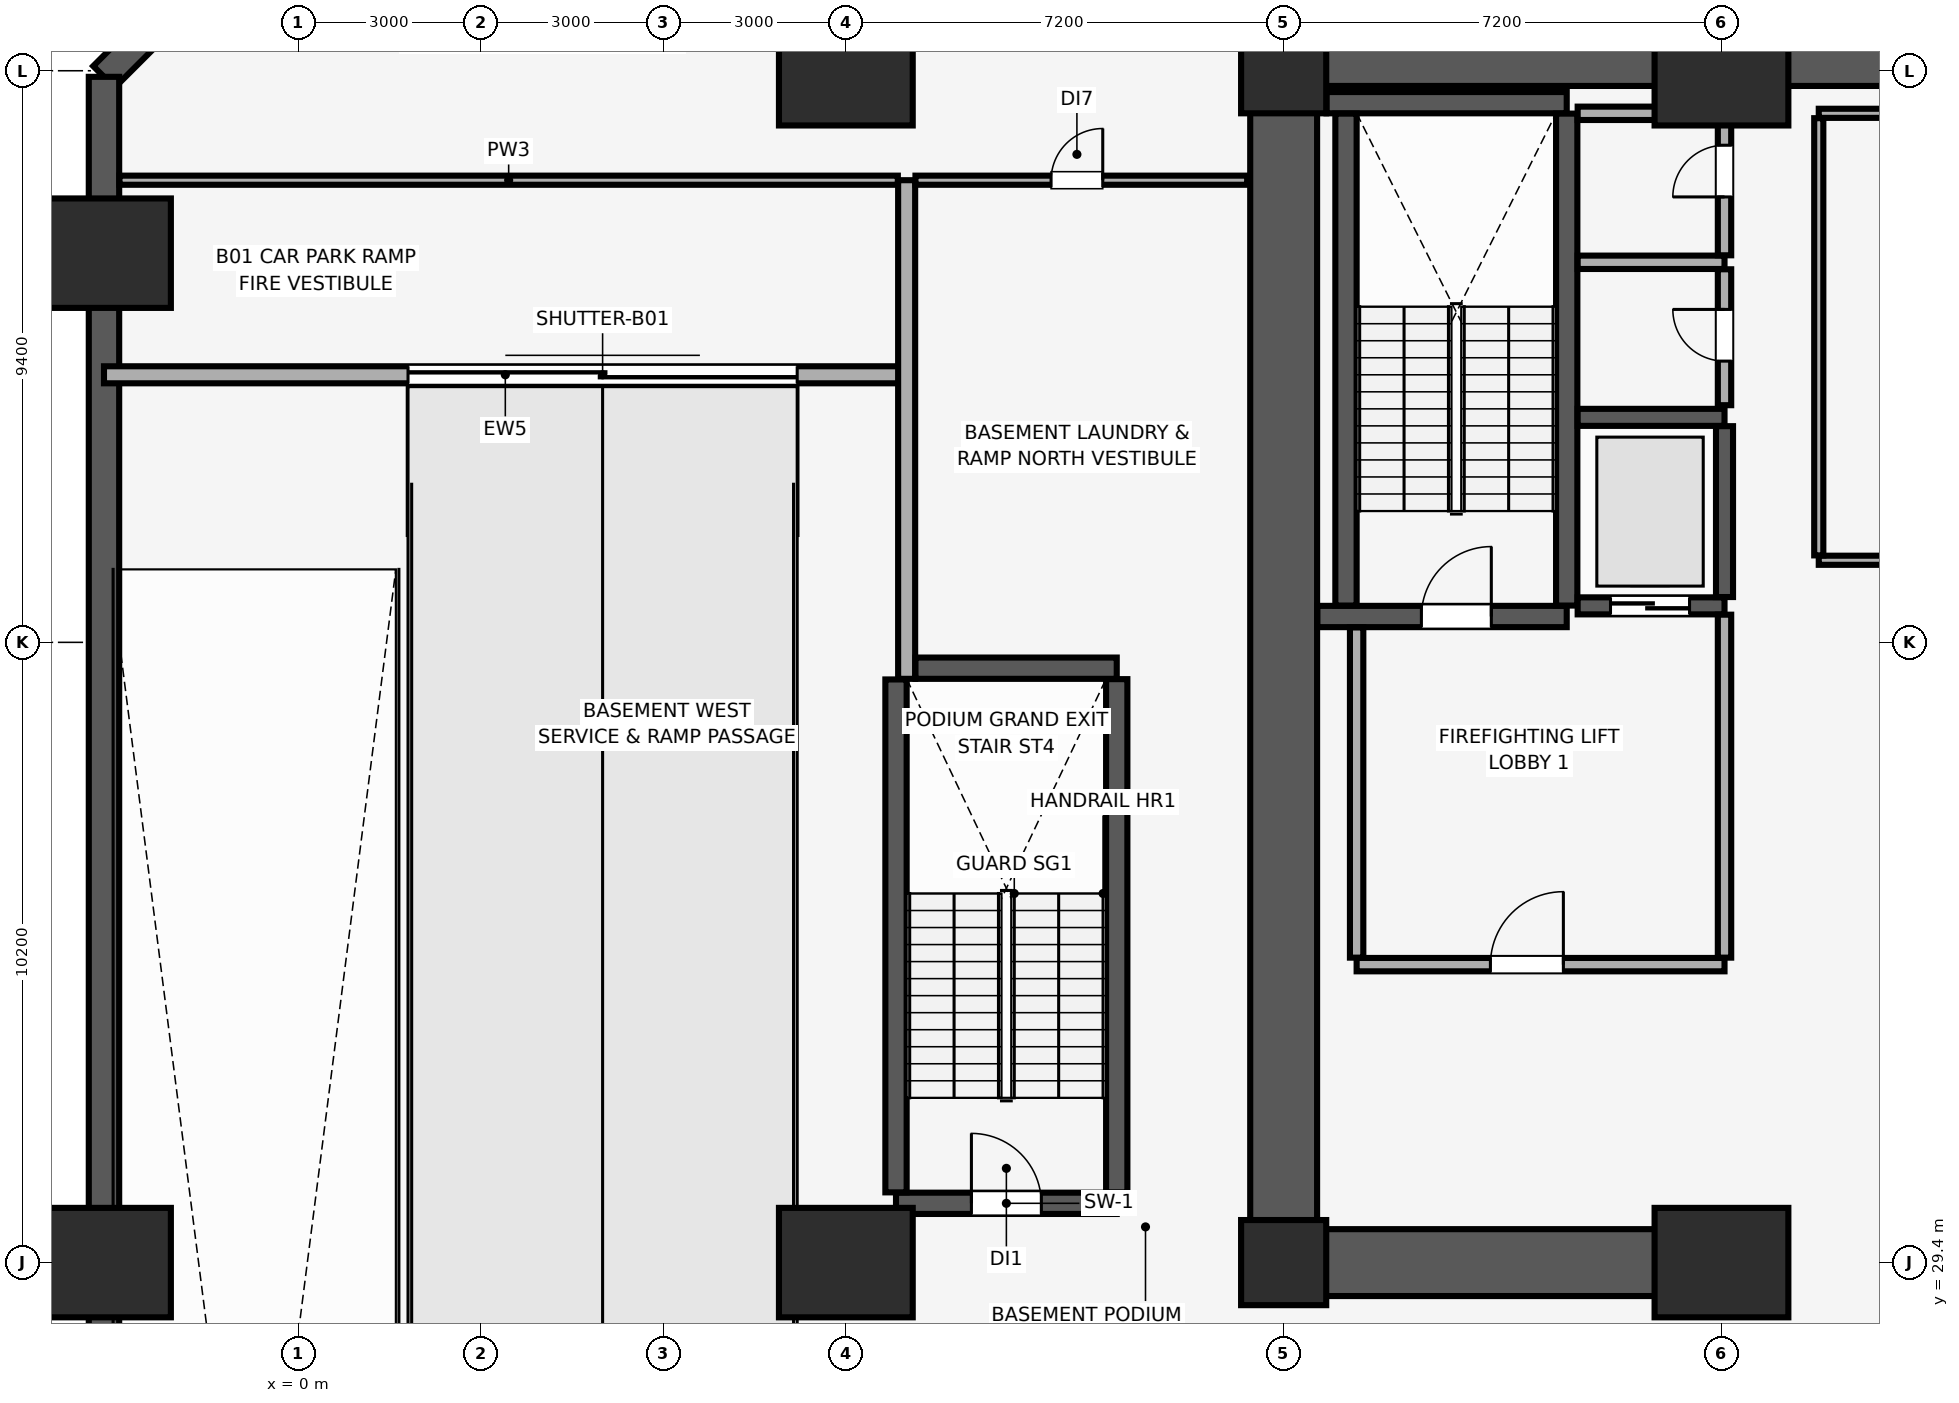
"""IFC4 building model, lengths in metres.
Left out: names, types, materials, properties, quantities, classifications, styles, units other than length and angle.
Written with IfcOpenShell. Run it as: python <this file> out.ifc"""

import sys

from ifc_helpers import new_model, si_unit, direction, frame, frame_2d, origin, origin_2d, place, context, subcontext, project, spatial, rectangle, extrude, element, fill, save


model = new_model("IFC4")
c1 = context("Model", 3, precision=1e-05, world=origin(), true_north=direction((0.0, 1.0)))
c2 = subcontext(c1, "Body", "Model", "MODEL_VIEW")
j1 = project(units=[si_unit("LENGTHUNIT", "METRE"), si_unit("PLANEANGLEUNIT", "RADIAN")], contexts=[c1])
p1 = place(None, origin())
s1 = spatial("IfcSite", under=j1, at=p1, CompositionType="ELEMENT")
p2 = place(p1, origin())
s2 = spatial("IfcBuilding", under=s1, at=p2, CompositionType="ELEMENT")
p3 = place(p2, frame((0.0, 0.0, -4.6)))
s3 = spatial("IfcBuildingStorey", under=s2, at=p3, CompositionType="ELEMENT", Elevation=-4.6)
for number, where, z_axis, x_axis in (
    (1, (-3.2, 29.4, 0.0), (0.0, 0.0, 1.0), (1.0, 0.0, 0.0)),
    (2, (-3.2, 46.0, 0.0), (0.0, 0.0, 1.0), (1.0, 0.0, 0.0)),
    (3, (9.0, 29.4, 0.0), (0.0, 0.0, 1.0), (1.0, 0.0, 0.0)),
    (4, (9.0, 49.0, 0.0), (0.0, 0.0, 1.0), (1.0, 0.0, 0.0)),
    (5, (23.4, 29.4, 0.0), (0.0, 0.0, 1.0), (1.0, 0.0, 0.0)),
    (6, (23.4, 49.0, 0.0), (0.0, 0.0, 1.0), (1.0, 0.0, 0.0)),
):
    element("IfcColumn", number, at=place(p3, frame(where, z_axis=z_axis, x_axis=x_axis)), inside=s3, PredefinedType="USERDEFINED", context=c2, shape_type="SweptSolid", body=[
        extrude(rectangle(XDim=2.2, YDim=1.8, at=origin_2d()), origin(), (0.0, 0.0, 1.0), 4.25),
    ])
for number, where, z_axis, x_axis in (
    (7, (16.2, 29.4, 0.0), (0.0, 0.0, 1.0), (1.0, 0.0, 0.0)),
    (8, (16.2, 49.0, 0.0), (0.0, 0.0, 1.0), (1.0, 0.0, 0.0)),
):
    element("IfcColumn", number, at=place(p3, frame(where, z_axis=z_axis, x_axis=x_axis)), inside=s3, PredefinedType="COLUMN", context=c2, shape_type="SweptSolid", body=[
        extrude(rectangle(XDim=1.4, YDim=1.4, at=origin_2d()), origin(), (0.0, 0.0, 1.0), 4.25),
    ])
p4 = place(p3, frame((0.4, 52.5, 0.0), z_axis=(0.0, 0.0, 1.0), x_axis=(-0.707082803744, -0.707130757816, 0.0)))
e9 = element("IfcWall", 9, at=p4, inside=s3, PredefinedType="USERDEFINED", context=c2, shape_type="SweptSolid", body=[
    extrude(rectangle(XDim=5.091, YDim=0.5, at=frame_2d((2.545, 0.0))), origin(), (0.0, 0.0, 1.0), 4.25),
])
p5 = place(p3, frame((-3.2, 48.9, 0.0), z_axis=(0.0, 0.0, 1.0), x_axis=(0.0, -1.0, 0.0)))
e10 = element("IfcWall", 10, at=p5, inside=s3, PredefinedType="USERDEFINED", context=c2, shape_type="SweptSolid", body=[
    extrude(rectangle(XDim=47.8, YDim=0.5, at=frame_2d((23.9, 0.0))), origin(), (0.0, 0.0, 1.0), 4.25),
])
p6 = place(p3, frame((-3.2, 44.0, 0.0), z_axis=(0.0, 0.0, 1.0), x_axis=(1.0, 0.0, 0.0)))
e11 = element("IfcWall", 11, at=p6, inside=s3, PredefinedType="SOLIDWALL", context=c2, shape_type="SweptSolid", body=[
    extrude(rectangle(XDim=13.2, YDim=0.28, at=frame_2d((6.6, 0.0))), origin(), (0.0, 0.0, 1.0), 4.25),
])
p7 = place(p6, frame((5.0, 0.0, 0.0)))
e12 = element("IfcOpeningElement", 12, at=p7, cuts=e11, PredefinedType="OPENING", context=c2, shape_type="SweptSolid", body=[
    extrude(rectangle(XDim=6.4, YDim=3.1, at=frame_2d((3.2, 1.55))), frame((0.0, 0.15, 0.0), z_axis=(0.0, -1.0, 0.0), x_axis=(1.0, 0.0, 0.0)), (0.0, 0.0, 1.0), 0.3),
])
p8 = place(p3, frame((10.0, 39.0, 0.0), z_axis=(0.0, 0.0, 1.0), x_axis=(0.0, 1.0, 0.0)))
e13 = element("IfcWall", 13, at=p8, inside=s3, PredefinedType="SOLIDWALL", context=c2, shape_type="SweptSolid", body=[
    extrude(rectangle(XDim=8.2, YDim=0.28, at=frame_2d((4.1, 0.0))), origin(), (0.0, 0.0, 1.0), 4.25),
])
p9 = place(p3, frame((16.2, 49.3, 0.0), z_axis=(0.0, 0.0, 1.0), x_axis=(1.0, 0.0, 0.0)))
e14 = element("IfcWall", 14, at=p9, inside=s3, PredefinedType="SHEAR", context=c2, shape_type="SweptSolid", body=[
    extrude(rectangle(XDim=51.6, YDim=1.1, at=frame_2d((25.8, 0.0))), origin(), (0.0, 0.0, 1.0), 4.25),
])
p10 = place(p3, frame((16.2, 29.4, 0.0), z_axis=(0.0, 0.0, 1.0), x_axis=(0.0, 1.0, 0.0)))
e15 = element("IfcWall", 15, at=p10, inside=s3, PredefinedType="SHEAR", context=c2, shape_type="SweptSolid", body=[
    extrude(rectangle(XDim=19.2, YDim=1.1, at=frame_2d((9.6, 0.0))), origin(), (0.0, 0.0, 1.0), 4.25),
])
p11 = place(p3, frame((16.755, 29.4, 0.0), z_axis=(0.0, 0.0, 1.0), x_axis=(1.0, 0.0, 0.0)))
e16 = element("IfcWall", 16, at=p11, inside=s3, PredefinedType="SHEAR", context=c2, shape_type="SweptSolid", body=[
    extrude(rectangle(XDim=6.845, YDim=1.1, at=frame_2d((3.423, 0.0))), origin(), (0.0, 0.0, 1.0), 4.25),
])
p12 = place(p3, frame((16.755, 40.025, 0.0), z_axis=(0.0, 0.0, 1.0), x_axis=(1.0, 0.0, 0.0)))
e17 = element("IfcWall", 17, at=p12, inside=s3, PredefinedType="SHEAR", context=c2, shape_type="SweptSolid", body=[
    extrude(rectangle(XDim=4.1, YDim=0.35, at=frame_2d((2.05, 0.0))), origin(), (0.0, 0.0, 1.0), 4.25),
])
p13 = place(p12, frame((1.71, 0.0, 0.0)))
e18 = element("IfcOpeningElement", 18, at=p13, cuts=e17, PredefinedType="OPENING", context=c2, shape_type="SweptSolid", body=[
    extrude(rectangle(XDim=1.15, YDim=2.15, at=frame_2d((0.575, 1.075))), frame((0.0, 0.185, 0.0), z_axis=(0.0, -1.0, 0.0), x_axis=(1.0, 0.0, 0.0)), (0.0, 0.0, 1.0), 0.37),
])
p14 = place(p3, frame((16.905, 48.475, 0.0), z_axis=(0.0, 0.0, 1.0), x_axis=(1.0, 0.0, 0.0)))
e19 = element("IfcWall", 19, at=p14, inside=s3, PredefinedType="SHEAR", context=c2, shape_type="SweptSolid", body=[
    extrude(rectangle(XDim=3.95, YDim=0.35, at=frame_2d((1.975, 0.0))), origin(), (0.0, 0.0, 1.0), 4.25),
])
for number, where, z_axis, x_axis in (
    (20, (17.225, 40.205, 0.0), (0.0, 0.0, 1.0), (0.0, 1.0, 0.0)),
    (21, (20.855, 40.205, 0.0), (0.0, 0.0, 1.0), (0.0, 1.0, 0.0)),
):
    element("IfcWall", number, at=place(p3, frame(where, z_axis=z_axis, x_axis=x_axis)), inside=s3, PredefinedType="SHEAR", context=c2, shape_type="SweptSolid", body=[
        extrude(rectangle(XDim=8.09, YDim=0.35, at=frame_2d((4.045, 0.0))), origin(), (0.0, 0.0, 1.0), 4.25),
    ])
p15 = place(p3, frame((9.825, 30.375, 0.0), z_axis=(0.0, 0.0, 1.0), x_axis=(1.0, 0.0, 0.0)))
e22 = element("IfcWall", 22, at=p15, inside=s3, PredefinedType="SHEAR", context=c2, shape_type="SweptSolid", body=[
    extrude(rectangle(XDim=3.63, YDim=0.35, at=frame_2d((1.815, 0.0))), origin(), (0.0, 0.0, 1.0), 4.25),
])
p16 = place(p15, frame((1.24, 0.0, 0.0)))
e23 = element("IfcOpeningElement", 23, at=p16, cuts=e22, PredefinedType="OPENING", context=c2, shape_type="SweptSolid", body=[
    extrude(rectangle(XDim=1.15, YDim=2.15, at=frame_2d((0.575, 1.075))), frame((0.0, 0.185, 0.0), z_axis=(0.0, -1.0, 0.0), x_axis=(1.0, 0.0, 0.0)), (0.0, 0.0, 1.0), 0.37),
])
p17 = place(p3, frame((10.145, 39.175, 0.0), z_axis=(0.0, 0.0, 1.0), x_axis=(1.0, 0.0, 0.0)))
e24 = element("IfcWall", 24, at=p17, inside=s3, PredefinedType="SHEAR", context=c2, shape_type="SweptSolid", body=[
    extrude(rectangle(XDim=3.31, YDim=0.35, at=frame_2d((1.655, 0.0))), origin(), (0.0, 0.0, 1.0), 4.25),
])
p18 = place(p3, frame((9.825, 30.555, 0.0), z_axis=(0.0, 0.0, 1.0), x_axis=(0.0, 1.0, 0.0)))
e25 = element("IfcWall", 25, at=p18, inside=s3, PredefinedType="SHEAR", context=c2, shape_type="SweptSolid", body=[
    extrude(rectangle(XDim=8.435, YDim=0.35, at=frame_2d((4.218, 0.0))), origin(), (0.0, 0.0, 1.0), 4.25),
])
p19 = place(p3, frame((13.455, 30.555, 0.0), z_axis=(0.0, 0.0, 1.0), x_axis=(0.0, 1.0, 0.0)))
e26 = element("IfcWall", 26, at=p19, inside=s3, PredefinedType="SHEAR", context=c2, shape_type="SweptSolid", body=[
    extrude(rectangle(XDim=8.44, YDim=0.35, at=frame_2d((4.22, 0.0))), origin(), (0.0, 0.0, 1.0), 4.25),
])
p20 = place(p3, frame((21.035, 40.2, 0.0), z_axis=(0.0, 0.0, 1.0), x_axis=(1.0, 0.0, 0.0)))
e27 = element("IfcWall", 27, at=p20, inside=s3, PredefinedType="SHEAR", context=c2, shape_type="SweptSolid", body=[
    extrude(rectangle(XDim=2.415, YDim=0.28, at=frame_2d((1.208, 0.0))), origin(), (0.0, 0.0, 1.0), 4.25),
])
p21 = place(p20, frame((0.54, 0.0, 0.0)))
e28 = element("IfcOpeningElement", 28, at=p21, cuts=e27, PredefinedType="OPENING", context=c2, shape_type="SweptSolid", body=[
    extrude(rectangle(XDim=1.3, YDim=2.3, at=frame_2d((0.65, 1.15))), frame((0.0, 0.15, 0.0), z_axis=(0.0, -1.0, 0.0), x_axis=(1.0, 0.0, 0.0)), (0.0, 0.0, 1.0), 0.3),
])
p22 = place(p3, frame((21.035, 43.3, 0.0), z_axis=(0.0, 0.0, 1.0), x_axis=(1.0, 0.0, 0.0)))
e29 = element("IfcWall", 29, at=p22, inside=s3, PredefinedType="SHEAR", context=c2, shape_type="SweptSolid", body=[
    extrude(rectangle(XDim=2.415, YDim=0.28, at=frame_2d((1.208, 0.0))), origin(), (0.0, 0.0, 1.0), 4.25),
])
p23 = place(p3, frame((23.45, 40.345, 0.0), z_axis=(0.0, 0.0, 1.0), x_axis=(0.0, 1.0, 0.0)))
e30 = element("IfcWall", 30, at=p23, inside=s3, PredefinedType="SHEAR", context=c2, shape_type="SweptSolid", body=[
    extrude(rectangle(XDim=2.81, YDim=0.28, at=frame_2d((1.405, 0.0))), origin(), (0.0, 0.0, 1.0), 4.25),
])
p24 = place(p3, frame((17.4, 34.3, 0.0), z_axis=(0.0, 0.0, 1.0), x_axis=(1.0, 0.0, 0.0)))
e31 = element("IfcWall", 31, at=p24, inside=s3, PredefinedType="PARTITIONING", context=c2, shape_type="SweptSolid", body=[
    extrude(rectangle(XDim=6.05, YDim=0.22, at=frame_2d((3.025, 0.0))), origin(), (0.0, 0.0, 1.0), 4.25),
])
p25 = place(p24, frame((2.2, 0.0, 0.0)))
e32 = element("IfcOpeningElement", 32, at=p25, cuts=e31, PredefinedType="OPENING", context=c2, shape_type="SweptSolid", body=[
    extrude(rectangle(XDim=1.2, YDim=2.15, at=frame_2d((0.6, 1.075))), frame((0.0, 0.12, 0.0), z_axis=(0.0, -1.0, 0.0), x_axis=(1.0, 0.0, 0.0)), (0.0, 0.0, 1.0), 0.24),
])
p26 = place(p3, frame((17.4, 34.415, 0.0), z_axis=(0.0, 0.0, 1.0), x_axis=(0.0, 1.0, 0.0)))
e33 = element("IfcWall", 33, at=p26, inside=s3, PredefinedType="PARTITIONING", context=c2, shape_type="SweptSolid", body=[
    extrude(rectangle(XDim=5.43, YDim=0.22, at=frame_2d((2.715, 0.0))), origin(), (0.0, 0.0, 1.0), 4.25),
])
p27 = place(p3, frame((23.45, 34.415, 0.0), z_axis=(0.0, 0.0, 1.0), x_axis=(0.0, 1.0, 0.0)))
e34 = element("IfcWall", 34, at=p27, inside=s3, PredefinedType="PARTITIONING", context=c2, shape_type="SweptSolid", body=[
    extrude(rectangle(XDim=5.64, YDim=0.22, at=frame_2d((2.82, 0.0))), origin(), (0.0, 0.0, 1.0), 4.25),
])
p28 = place(p3, frame((21.035, 45.85, 0.0), z_axis=(0.0, 0.0, 1.0), x_axis=(1.0, 0.0, 0.0)))
e35 = element("IfcWall", 35, at=p28, inside=s3, PredefinedType="PARTITIONING", context=c2, shape_type="SweptSolid", body=[
    extrude(rectangle(XDim=2.415, YDim=0.22, at=frame_2d((1.208, 0.0))), origin(), (0.0, 0.0, 1.0), 4.25),
])
p29 = place(p3, frame((23.45, 43.5, 0.0), z_axis=(0.0, 0.0, 1.0), x_axis=(0.0, 1.0, 0.0)))
e36 = element("IfcWall", 36, at=p29, inside=s3, PredefinedType="PARTITIONING", context=c2, shape_type="SweptSolid", body=[
    extrude(rectangle(XDim=2.235, YDim=0.22, at=frame_2d((1.118, 0.0))), origin(), (0.0, 0.0, 1.0), 4.25),
])
p30 = place(p29, frame((0.725, 0.0, 0.0)))
e37 = element("IfcOpeningElement", 37, at=p30, cuts=e36, PredefinedType="OPENING", context=c2, shape_type="SweptSolid", body=[
    extrude(rectangle(XDim=0.85, YDim=2.1, at=frame_2d((0.425, 1.05))), frame((0.0, 0.12, 0.0), z_axis=(0.0, -1.0, 0.0), x_axis=(1.0, 0.0, 0.0)), (0.0, 0.0, 1.0), 0.24),
])
p31 = place(p3, frame((21.035, 48.3, 0.0), z_axis=(0.0, 0.0, 1.0), x_axis=(1.0, 0.0, 0.0)))
e38 = element("IfcWall", 38, at=p31, inside=s3, PredefinedType="PARTITIONING", context=c2, shape_type="SweptSolid", body=[
    extrude(rectangle(XDim=2.415, YDim=0.22, at=frame_2d((1.208, 0.0))), origin(), (0.0, 0.0, 1.0), 4.25),
])
p32 = place(p3, frame((23.45, 45.965, 0.0), z_axis=(0.0, 0.0, 1.0), x_axis=(0.0, 1.0, 0.0)))
e39 = element("IfcWall", 39, at=p32, inside=s3, PredefinedType="PARTITIONING", context=c2, shape_type="SweptSolid", body=[
    extrude(rectangle(XDim=2.22, YDim=0.22, at=frame_2d((1.11, 0.0))), origin(), (0.0, 0.0, 1.0), 4.25),
])
p33 = place(p32, frame((0.96, 0.0, 0.0)))
e40 = element("IfcOpeningElement", 40, at=p33, cuts=e39, PredefinedType="OPENING", context=c2, shape_type="SweptSolid", body=[
    extrude(rectangle(XDim=0.85, YDim=2.1, at=frame_2d((0.425, 1.05))), frame((0.0, 0.12, 0.0), z_axis=(0.0, -1.0, 0.0), x_axis=(1.0, 0.0, 0.0)), (0.0, 0.0, 1.0), 0.24),
])
p34 = place(p3, frame((25.0, 40.95, 0.0), z_axis=(0.0, 0.0, 1.0), x_axis=(1.0, 0.0, 0.0)))
e41 = element("IfcWall", 41, at=p34, inside=s3, PredefinedType="PARTITIONING", context=c2, shape_type="SweptSolid", body=[
    extrude(rectangle(XDim=7.8, YDim=0.15, at=frame_2d((3.9, 0.0))), origin(), (0.0, 0.0, 1.0), 4.25),
])
p35 = place(p34, frame((3.475, 0.0, 0.0)))
e42 = element("IfcOpeningElement", 42, at=p35, cuts=e41, PredefinedType="OPENING", context=c2, shape_type="SweptSolid", body=[
    extrude(rectangle(XDim=0.85, YDim=2.1, at=frame_2d((0.425, 1.05))), frame((0.0, 0.085, 0.0), z_axis=(0.0, -1.0, 0.0), x_axis=(1.0, 0.0, 0.0)), (0.0, 0.0, 1.0), 0.17),
])
p36 = place(p3, frame((25.0, 48.3, 0.0), z_axis=(0.0, 0.0, 1.0), x_axis=(1.0, 0.0, 0.0)))
e43 = element("IfcWall", 43, at=p36, inside=s3, PredefinedType="PARTITIONING", context=c2, shape_type="SweptSolid", body=[
    extrude(rectangle(XDim=7.8, YDim=0.15, at=frame_2d((3.9, 0.0))), origin(), (0.0, 0.0, 1.0), 4.25),
])
p37 = place(p3, frame((25.0, 41.03, 0.0), z_axis=(0.0, 0.0, 1.0), x_axis=(0.0, 1.0, 0.0)))
e44 = element("IfcWall", 44, at=p37, inside=s3, PredefinedType="PARTITIONING", context=c2, shape_type="SweptSolid", body=[
    extrude(rectangle(XDim=7.19, YDim=0.15, at=frame_2d((3.595, 0.0))), origin(), (0.0, 0.0, 1.0), 4.25),
])
p38 = place(p3, frame((-2.945, 47.2, 0.0), z_axis=(0.0, 0.0, 1.0), x_axis=(1.0, 0.0, 0.0)))
e45 = element("IfcWall", 45, at=p38, inside=s3, PredefinedType="PARTITIONING", context=c2, shape_type="SweptSolid", body=[
    extrude(rectangle(XDim=12.8, YDim=0.15, at=frame_2d((6.4, 0.0))), origin(), (0.0, 0.0, 1.0), 4.25),
])
p39 = place(p3, frame((10.145, 47.2, 0.0), z_axis=(0.0, 0.0, 1.0), x_axis=(1.0, 0.0, 0.0)))
e46 = element("IfcWall", 46, at=p39, inside=s3, PredefinedType="PARTITIONING", context=c2, shape_type="SweptSolid", body=[
    extrude(rectangle(XDim=5.455, YDim=0.15, at=frame_2d((2.728, 0.0))), origin(), (0.0, 0.0, 1.0), 4.25),
])
p40 = place(p39, frame((2.23, 0.0, 0.0)))
e47 = element("IfcOpeningElement", 47, at=p40, cuts=e46, PredefinedType="OPENING", context=c2, shape_type="SweptSolid", body=[
    extrude(rectangle(XDim=0.85, YDim=2.1, at=frame_2d((0.425, 1.05))), frame((0.0, 0.085, 0.0), z_axis=(0.0, -1.0, 0.0), x_axis=(1.0, 0.0, 0.0)), (0.0, 0.0, 1.0), 0.17),
])
p41 = place(p3, frame((15.6, 48.61, 0.0), z_axis=(0.0, 0.0, 1.0), x_axis=(0.0, 1.0, 0.0)))
e48 = element("IfcWall", 48, at=p41, inside=s3, PredefinedType="PARTITIONING", context=c2, shape_type="SweptSolid", body=[
    extrude(rectangle(XDim=3.635, YDim=0.15, at=frame_2d((1.817, 0.0))), origin(), (0.0, 0.0, 1.0), 4.25),
])
p42 = place(p7, origin())
e49 = element("IfcDoor", 49, at=p42, inside=s3, OperationType="SINGLE_SWING_LEFT", PredefinedType="GATE", context=c2, shape_type="SweptSolid", body=[
    extrude(rectangle(XDim=6.4, YDim=3.1, at=frame_2d((3.2, 1.55))), frame((0.0, 0.025, 0.0), z_axis=(0.0, -1.0, 0.0), x_axis=(1.0, 0.0, 0.0)), (0.0, 0.0, 1.0), 0.05),
])
fill(e12, e49)
p43 = place(p13, origin())
e50 = element("IfcDoor", 50, at=p43, inside=s3, OperationType="SINGLE_SWING_RIGHT", PredefinedType="DOOR", context=c2, shape_type="SweptSolid", body=[
    extrude(rectangle(XDim=1.15, YDim=2.15, at=frame_2d((0.575, 1.075))), frame((0.0, 0.025, 0.0), z_axis=(0.0, -1.0, 0.0), x_axis=(1.0, 0.0, 0.0)), (0.0, 0.0, 1.0), 0.05),
])
fill(e18, e50)
p44 = place(p16, origin())
e51 = element("IfcDoor", 51, at=p44, inside=s3, OperationType="SINGLE_SWING_LEFT", PredefinedType="DOOR", context=c2, shape_type="SweptSolid", body=[
    extrude(rectangle(XDim=1.15, YDim=2.15, at=frame_2d((0.575, 1.075))), frame((0.0, 0.025, 0.0), z_axis=(0.0, -1.0, 0.0), x_axis=(1.0, 0.0, 0.0)), (0.0, 0.0, 1.0), 0.05),
])
fill(e23, e51)
p45 = place(p21, origin())
e52 = element("IfcDoor", 52, at=p45, inside=s3, OperationType="DOUBLE_DOOR_SLIDING", PredefinedType="DOOR", context=c2, shape_type="SweptSolid", body=[
    extrude(rectangle(XDim=1.3, YDim=2.3, at=frame_2d((0.65, 1.15))), frame((0.0, 0.025, 0.0), z_axis=(0.0, -1.0, 0.0), x_axis=(1.0, 0.0, 0.0)), (0.0, 0.0, 1.0), 0.05),
])
fill(e28, e52)
p46 = place(p25, origin())
e53 = element("IfcDoor", 53, at=p46, inside=s3, OperationType="SINGLE_SWING_RIGHT", PredefinedType="DOOR", context=c2, shape_type="SweptSolid", body=[
    extrude(rectangle(XDim=1.2, YDim=2.15, at=frame_2d((0.6, 1.075))), frame((0.0, 0.025, 0.0), z_axis=(0.0, -1.0, 0.0), x_axis=(1.0, 0.0, 0.0)), (0.0, 0.0, 1.0), 0.05),
])
fill(e32, e53)
p47 = place(p30, origin())
e54 = element("IfcDoor", 54, at=p47, inside=s3, OperationType="SINGLE_SWING_RIGHT", PredefinedType="DOOR", context=c2, shape_type="SweptSolid", body=[
    extrude(rectangle(XDim=0.85, YDim=2.1, at=frame_2d((0.425, 1.05))), frame((0.0, 0.025, 0.0), z_axis=(0.0, -1.0, 0.0), x_axis=(1.0, 0.0, 0.0)), (0.0, 0.0, 1.0), 0.05),
])
fill(e37, e54)
p48 = place(p33, origin())
e55 = element("IfcDoor", 55, at=p48, inside=s3, OperationType="SINGLE_SWING_LEFT", PredefinedType="DOOR", context=c2, shape_type="SweptSolid", body=[
    extrude(rectangle(XDim=0.85, YDim=2.1, at=frame_2d((0.425, 1.05))), frame((0.0, 0.025, 0.0), z_axis=(0.0, -1.0, 0.0), x_axis=(1.0, 0.0, 0.0)), (0.0, 0.0, 1.0), 0.05),
])
fill(e40, e55)
p49 = place(p40, origin())
e56 = element("IfcDoor", 56, at=p49, inside=s3, OperationType="SINGLE_SWING_RIGHT", PredefinedType="DOOR", context=c2, shape_type="SweptSolid", body=[
    extrude(rectangle(XDim=0.85, YDim=2.1, at=frame_2d((0.425, 1.05))), frame((0.0, 0.025, 0.0), z_axis=(0.0, -1.0, 0.0), x_axis=(1.0, 0.0, 0.0)), (0.0, 0.0, 1.0), 0.05),
])
fill(e47, e56)
save(model, sys.argv[1])
